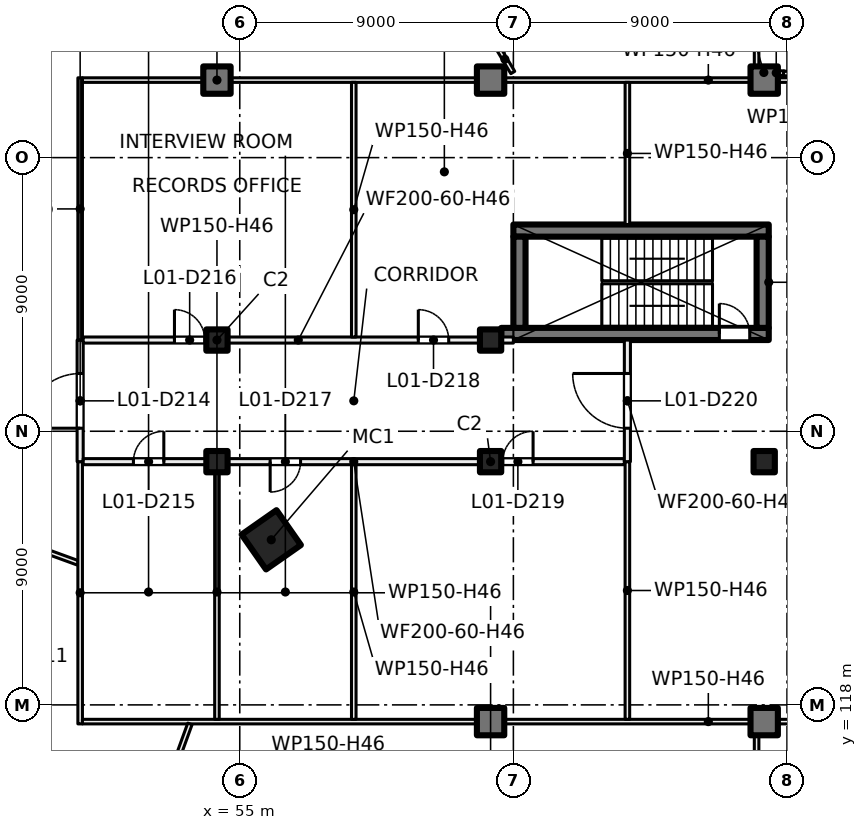
"""IFC4 building model, lengths in metres.
Left out: names, types, materials, properties, quantities, classifications, styles, units other than length and angle.
Written with IfcOpenShell. Run it as: python <this file> out.ifc"""

import sys

from ifc_helpers import new_model, si_unit, direction, frame, frame_2d, origin, origin_2d, place, context, subcontext, project, spatial, rectangle, hollow_rectangle, extrude, element, fill, save


model = new_model("IFC4")
c1 = context("Model", 3, precision=1e-05, world=origin(), true_north=direction((0.0, 1.0)))
c2 = subcontext(c1, "Body", "Model", "MODEL_VIEW")
j1 = project(units=[si_unit("LENGTHUNIT", "METRE"), si_unit("PLANEANGLEUNIT", "RADIAN")], contexts=[c1])
p1 = place(None, origin())
s1 = spatial("IfcSite", under=j1, at=p1, CompositionType="ELEMENT")
p2 = place(p1, origin())
s2 = spatial("IfcBuilding", under=s1, at=p2, CompositionType="ELEMENT")
p3 = place(p2, frame((0.0, 0.0, 7.5)))
s3 = spatial("IfcBuildingStorey", under=s2, at=p3, CompositionType="ELEMENT", Elevation=7.5)
p4 = place(p3, frame((56.036, 123.43, 0.0), z_axis=(0.0, 0.0, 1.0), x_axis=(0.573576436351, -0.819152044289, 0.0)))
e1 = element("IfcColumn", 1, at=p4, inside=s3, PredefinedType="COLUMN", context=c2, shape_type="SweptSolid", body=[
    extrude(hollow_rectangle(XDim=1.4, YDim=1.4, WallThickness=0.04, at=origin_2d()), origin(), (0.0, 0.0, 1.0), 5.0),
])
for number, where, z_axis, x_axis in (
    (2, (54.25, 130.0, 0.0), (0.0, 0.0, 1.0), (1.0, 0.0, 0.0)),
    (3, (63.25, 130.0, 0.0), (0.0, 0.0, 1.0), (1.0, 0.0, 0.0)),
    (4, (54.25, 126.0, 0.0), (0.0, 0.0, 1.0), (1.0, 0.0, 0.0)),
    (5, (63.25, 126.0, 0.0), (0.0, 0.0, 1.0), (1.0, 0.0, 0.0)),
    (6, (72.25, 126.0, 0.0), (0.0, 0.0, 1.0), (1.0, 0.0, 0.0)),
):
    element("IfcColumn", number, at=place(p3, frame(where, z_axis=z_axis, x_axis=x_axis)), inside=s3, PredefinedType="COLUMN", context=c2, shape_type="SweptSolid", body=[
        extrude(rectangle(XDim=0.7, YDim=0.7, at=origin_2d()), origin(), (0.0, 0.0, 1.0), 5.0),
    ])
for number, where, z_axis, x_axis in (
    (7, (54.25, 138.55, 0.0), (0.0, 0.0, 1.0), (1.0, 0.0, 0.0)),
    (8, (63.25, 138.55, 0.0), (0.0, 0.0, 1.0), (1.0, 0.0, 0.0)),
    (9, (72.25, 138.55, 0.0), (0.0, 0.0, 1.0), (1.0, 0.0, 0.0)),
    (10, (63.25, 117.45, 0.0), (0.0, 0.0, 1.0), (1.0, 0.0, 0.0)),
    (11, (72.25, 117.45, 0.0), (0.0, 0.0, 1.0), (1.0, 0.0, 0.0)),
):
    element("IfcColumn", number, at=place(p3, frame(where, z_axis=z_axis, x_axis=x_axis)), inside=s3, PredefinedType="COLUMN", context=c2, shape_type="SweptSolid", body=[
        extrude(rectangle(XDim=0.9, YDim=0.9, at=origin_2d()), origin(), (0.0, 0.0, 1.0), 5.0),
    ])
p5 = place(p3, frame((63.6, 130.2, 0.0), z_axis=(0.0, 0.0, 1.0), x_axis=(1.0, 0.0, 0.0)))
e12 = element("IfcWall", 12, at=p5, inside=s3, PredefinedType="SHEAR", context=c2, shape_type="SweptSolid", body=[
    extrude(rectangle(XDim=8.8, YDim=0.4, at=frame_2d((4.4, 0.0))), origin(), (0.0, 0.0, 1.0), 5.0),
])
p6 = place(p5, frame((7.175, 0.0, 0.0)))
e13 = element("IfcOpeningElement", 13, at=p6, cuts=e12, PredefinedType="OPENING", context=c2, shape_type="SweptSolid", body=[
    extrude(rectangle(XDim=1.0, YDim=2.1, at=frame_2d((0.5, 1.05))), frame((0.0, 0.21, 0.0), z_axis=(0.0, -1.0, 0.0), x_axis=(1.0, 0.0, 0.0)), (0.0, 0.0, 1.0), 0.42),
])
p7 = place(p3, frame((64.0, 133.6, 0.0), z_axis=(0.0, 0.0, 1.0), x_axis=(1.0, 0.0, 0.0)))
e14 = element("IfcWall", 14, at=p7, inside=s3, PredefinedType="SHEAR", context=c2, shape_type="SweptSolid", body=[
    extrude(rectangle(XDim=8.4, YDim=0.4, at=frame_2d((4.2, 0.0))), origin(), (0.0, 0.0, 1.0), 5.0),
])
for number, where, z_axis, x_axis in (
    (15, (64.2, 130.4, 0.0), (0.0, 0.0, 1.0), (0.0, 1.0, 0.0)),
    (16, (72.2, 130.4, 0.0), (0.0, 0.0, 1.0), (0.0, 1.0, 0.0)),
):
    element("IfcWall", number, at=place(p3, frame(where, z_axis=z_axis, x_axis=x_axis)), inside=s3, PredefinedType="SHEAR", context=c2, shape_type="SweptSolid", body=[
        extrude(rectangle(XDim=3.0, YDim=0.4, at=frame_2d((1.5, 0.0))), origin(), (0.0, 0.0, 1.0), 5.0),
    ])
p8 = place(p3, frame((46.597, 123.792, 0.0), z_axis=(0.0, 0.0, 1.0), x_axis=(0.939619227089, -0.342221723572, 0.0)))
e17 = element("IfcWall", 17, at=p8, inside=s3, PredefinedType="PARTITIONING", context=c2, shape_type="SweptSolid", body=[
    extrude(rectangle(XDim=3.276, YDim=0.15, at=frame_2d((1.638, 0.0))), origin(), (0.0, 0.0, 1.0), 4.6),
])
p9 = place(p3, frame((49.75, 117.375, 0.0), z_axis=(0.0, 0.0, 1.0), x_axis=(0.0, 1.0, 0.0)))
e18 = element("IfcWall", 18, at=p9, inside=s3, PredefinedType="PARTITIONING", context=c2, shape_type="SweptSolid", body=[
    extrude(rectangle(XDim=8.625, YDim=0.15, at=frame_2d((4.312, 0.0))), origin(), (0.0, 0.0, 1.0), 4.6),
])
p10 = place(p3, frame((91.0, 117.45, 0.0), z_axis=(0.0, 0.0, 1.0), x_axis=(-1.0, 0.0, 0.0)))
e19 = element("IfcWall", 19, at=p10, inside=s3, PredefinedType="PARTITIONING", context=c2, shape_type="SweptSolid", body=[
    extrude(rectangle(XDim=41.175, YDim=0.15, at=frame_2d((20.587, 0.0))), origin(), (0.0, 0.0, 1.0), 4.6),
])
p11 = place(p10, frame((11.5, 0.0, 0.0)))
e20 = element("IfcOpeningElement", 20, at=p11, cuts=e19, PredefinedType="OPENING", context=c2, shape_type="SweptSolid", body=[
    extrude(rectangle(XDim=1.0, YDim=2.1, at=frame_2d((0.5, 1.05))), frame((0.0, 0.085, 0.0), z_axis=(0.0, -1.0, 0.0), x_axis=(1.0, 0.0, 0.0)), (0.0, 0.0, 1.0), 0.17),
])
p12 = place(p3, frame((49.75, 126.0, 0.0), z_axis=(0.0, 0.0, 1.0), x_axis=(0.0, 1.0, 0.0)))
e21 = element("IfcWall", 21, at=p12, inside=s3, PredefinedType="PARTITIONING", context=c2, shape_type="SweptSolid", body=[
    extrude(rectangle(XDim=4.0, YDim=0.2, at=frame_2d((2.0, 0.0))), origin(), (0.0, 0.0, 1.0), 4.6),
])
p13 = place(p12, frame((1.1, 0.0, 0.0)))
e22 = element("IfcOpeningElement", 22, at=p13, cuts=e21, PredefinedType="OPENING", context=c2, shape_type="SweptSolid", body=[
    extrude(rectangle(XDim=1.8, YDim=2.1, at=frame_2d((0.9, 1.05))), frame((0.0, 0.11, 0.0), z_axis=(0.0, -1.0, 0.0), x_axis=(1.0, 0.0, 0.0)), (0.0, 0.0, 1.0), 0.22),
])
p14 = place(p3, frame((67.65, 126.0, 0.0), z_axis=(0.0, 0.0, 1.0), x_axis=(-1.0, 0.0, 0.0)))
e23 = element("IfcWall", 23, at=p14, inside=s3, PredefinedType="PARTITIONING", context=c2, shape_type="SweptSolid", body=[
    extrude(rectangle(XDim=17.8, YDim=0.2, at=frame_2d((8.9, 0.0))), origin(), (0.0, 0.0, 1.0), 4.6),
])
p15 = place(p14, frame((15.148, 0.0, 0.0)))
e24 = element("IfcOpeningElement", 24, at=p15, cuts=e23, PredefinedType="OPENING", context=c2, shape_type="SweptSolid", body=[
    extrude(rectangle(XDim=1.0, YDim=2.1, at=frame_2d((0.5, 1.05))), frame((0.0, 0.11, 0.0), z_axis=(0.0, -1.0, 0.0), x_axis=(1.0, 0.0, 0.0)), (0.0, 0.0, 1.0), 0.22),
])
p16 = place(p14, frame((10.65, 0.0, 0.0)))
e25 = element("IfcOpeningElement", 25, at=p16, cuts=e23, PredefinedType="OPENING", context=c2, shape_type="SweptSolid", body=[
    extrude(rectangle(XDim=1.0, YDim=2.1, at=frame_2d((0.5, 1.05))), frame((0.0, 0.11, 0.0), z_axis=(0.0, -1.0, 0.0), x_axis=(1.0, 0.0, 0.0)), (0.0, 0.0, 1.0), 0.22),
])
p17 = place(p14, frame((3.002, 0.0, 0.0)))
e26 = element("IfcOpeningElement", 26, at=p17, cuts=e23, PredefinedType="OPENING", context=c2, shape_type="SweptSolid", body=[
    extrude(rectangle(XDim=1.0, YDim=2.1, at=frame_2d((0.5, 1.05))), frame((0.0, 0.11, 0.0), z_axis=(0.0, -1.0, 0.0), x_axis=(1.0, 0.0, 0.0)), (0.0, 0.0, 1.0), 0.22),
])
p18 = place(p3, frame((49.75, 130.0, 0.0), z_axis=(0.0, 0.0, 1.0), x_axis=(0.0, 1.0, 0.0)))
e27 = element("IfcWall", 27, at=p18, inside=s3, PredefinedType="PARTITIONING", context=c2, shape_type="SweptSolid", body=[
    extrude(rectangle(XDim=8.625, YDim=0.15, at=frame_2d((4.312, 0.0))), origin(), (0.0, 0.0, 1.0), 4.6),
])
p19 = place(p3, frame((49.85, 130.0, 0.0), z_axis=(0.0, 0.0, 1.0), x_axis=(1.0, 0.0, 0.0)))
e28 = element("IfcWall", 28, at=p19, inside=s3, PredefinedType="PARTITIONING", context=c2, shape_type="SweptSolid", body=[
    extrude(rectangle(XDim=14.15, YDim=0.2, at=frame_2d((7.075, 0.0))), origin(), (0.0, 0.0, 1.0), 4.6),
])
p20 = place(p19, frame((3.002, 0.0, 0.0)))
e29 = element("IfcOpeningElement", 29, at=p20, cuts=e28, PredefinedType="OPENING", context=c2, shape_type="SweptSolid", body=[
    extrude(rectangle(XDim=1.0, YDim=2.1, at=frame_2d((0.5, 1.05))), frame((0.0, 0.11, 0.0), z_axis=(0.0, -1.0, 0.0), x_axis=(1.0, 0.0, 0.0)), (0.0, 0.0, 1.0), 0.22),
])
p21 = place(p19, frame((11.023, 0.0, 0.0)))
e30 = element("IfcOpeningElement", 30, at=p21, cuts=e28, PredefinedType="OPENING", context=c2, shape_type="SweptSolid", body=[
    extrude(rectangle(XDim=1.0, YDim=2.1, at=frame_2d((0.5, 1.05))), frame((0.0, 0.11, 0.0), z_axis=(0.0, -1.0, 0.0), x_axis=(1.0, 0.0, 0.0)), (0.0, 0.0, 1.0), 0.22),
])
p22 = place(p3, frame((49.825, 138.55, 0.0), z_axis=(0.0, 0.0, 1.0), x_axis=(1.0, 0.0, 0.0)))
e31 = element("IfcWall", 31, at=p22, inside=s3, PredefinedType="PARTITIONING", context=c2, shape_type="SweptSolid", body=[
    extrude(rectangle(XDim=41.175, YDim=0.15, at=frame_2d((20.587, 0.0))), origin(), (0.0, 0.0, 1.0), 4.6),
])
p23 = place(p22, frame((29.645, 0.0, 0.0)))
e32 = element("IfcOpeningElement", 32, at=p23, cuts=e31, PredefinedType="OPENING", context=c2, shape_type="SweptSolid", body=[
    extrude(rectangle(XDim=1.0, YDim=2.1, at=frame_2d((0.5, 1.05))), frame((0.0, 0.085, 0.0), z_axis=(0.0, -1.0, 0.0), x_axis=(1.0, 0.0, 0.0)), (0.0, 0.0, 1.0), 0.17),
])
p24 = place(p22, frame((37.775, 0.0, 0.0)))
e33 = element("IfcOpeningElement", 33, at=p24, cuts=e31, PredefinedType="OPENING", context=c2, shape_type="SweptSolid", body=[
    extrude(rectangle(XDim=1.8, YDim=2.1, at=frame_2d((0.9, 1.05))), frame((0.0, 0.085, 0.0), z_axis=(0.0, -1.0, 0.0), x_axis=(1.0, 0.0, 0.0)), (0.0, 0.0, 1.0), 0.17),
])
p25 = place(p3, frame((51.579, 112.481, 0.0), z_axis=(0.0, 0.0, 1.0), x_axis=(0.341972650852, 0.939709905274, 0.0)))
e34 = element("IfcWall", 34, at=p25, inside=s3, PredefinedType="PARTITIONING", context=c2, shape_type="SweptSolid", body=[
    extrude(rectangle(XDim=5.208, YDim=0.15, at=frame_2d((2.604, 0.0))), origin(), (0.0, 0.0, 1.0), 4.6),
])
for number, where, z_axis, x_axis in (
    (35, (54.25, 117.525, 0.0), (0.0, 0.0, 1.0), (0.0, 1.0, 0.0)),
    (36, (58.75, 117.525, 0.0), (0.0, 0.0, 1.0), (0.0, 1.0, 0.0)),
    (37, (58.75, 130.1, 0.0), (0.0, 0.0, 1.0), (0.0, 1.0, 0.0)),
):
    element("IfcWall", number, at=place(p3, frame(where, z_axis=z_axis, x_axis=x_axis)), inside=s3, PredefinedType="PARTITIONING", context=c2, shape_type="SweptSolid", body=[
        extrude(rectangle(XDim=8.375, YDim=0.15, at=frame_2d((4.188, 0.0))), origin(), (0.0, 0.0, 1.0), 4.6),
    ])
p26 = place(p3, frame((63.459, 139.67, 0.0), z_axis=(0.0, 0.0, 1.0), x_axis=(0.514106720628, -0.857726226604, 0.0)))
e38 = element("IfcWall", 38, at=p26, inside=s3, PredefinedType="PARTITIONING", context=c2, shape_type="SweptSolid", body=[
    extrude(rectangle(XDim=1.015, YDim=0.15, at=frame_2d((0.508, 0.0))), origin(), (0.0, 0.0, 1.0), 4.6),
])
p27 = place(p3, frame((67.75, 117.525, 0.0), z_axis=(0.0, 0.0, 1.0), x_axis=(0.0, 1.0, 0.0)))
e39 = element("IfcWall", 39, at=p27, inside=s3, PredefinedType="PARTITIONING", context=c2, shape_type="SweptSolid", body=[
    extrude(rectangle(XDim=8.475, YDim=0.15, at=frame_2d((4.238, 0.0))), origin(), (0.0, 0.0, 1.0), 4.6),
])
p28 = place(p3, frame((67.75, 130.0, 0.0), z_axis=(0.0, 0.0, 1.0), x_axis=(0.0, -1.0, 0.0)))
e40 = element("IfcWall", 40, at=p28, inside=s3, PredefinedType="PARTITIONING", context=c2, shape_type="SweptSolid", body=[
    extrude(rectangle(XDim=4.0, YDim=0.2, at=frame_2d((2.0, 0.0))), origin(), (0.0, 0.0, 1.0), 4.6),
])
p29 = place(p28, frame((1.1, 0.0, 0.0)))
e41 = element("IfcOpeningElement", 41, at=p29, cuts=e40, PredefinedType="OPENING", context=c2, shape_type="SweptSolid", body=[
    extrude(rectangle(XDim=1.8, YDim=2.1, at=frame_2d((0.9, 1.05))), frame((0.0, 0.11, 0.0), z_axis=(0.0, -1.0, 0.0), x_axis=(1.0, 0.0, 0.0)), (0.0, 0.0, 1.0), 0.22),
])
p30 = place(p3, frame((67.75, 133.8, 0.0), z_axis=(0.0, 0.0, 1.0), x_axis=(0.0, 1.0, 0.0)))
e42 = element("IfcWall", 42, at=p30, inside=s3, PredefinedType="PARTITIONING", context=c2, shape_type="SweptSolid", body=[
    extrude(rectangle(XDim=4.675, YDim=0.15, at=frame_2d((2.337, 0.0))), origin(), (0.0, 0.0, 1.0), 4.6),
])
p31 = place(p3, frame((72.0, 109.0, 0.0), z_axis=(0.0, 0.0, 1.0), x_axis=(0.0, 1.0, 0.0)))
e43 = element("IfcWall", 43, at=p31, inside=s3, PredefinedType="PARTITIONING", context=c2, shape_type="SweptSolid", body=[
    extrude(rectangle(XDim=8.375, YDim=0.15, at=frame_2d((4.188, 0.0))), origin(), (0.0, 0.0, 1.0), 3.6),
])
p32 = place(p3, frame((72.0, 138.725, 0.0), z_axis=(0.0, 0.0, 1.0), x_axis=(0.0, 1.0, 0.0)))
e44 = element("IfcWall", 44, at=p32, inside=s3, PredefinedType="PARTITIONING", context=c2, shape_type="SweptSolid", body=[
    extrude(rectangle(XDim=5.35, YDim=0.15, at=frame_2d((2.675, 0.0))), origin(), (0.0, 0.0, 1.0), 4.6),
])
p33 = place(p3, frame((72.075, 138.8, 0.0), z_axis=(0.0, 0.0, 1.0), x_axis=(1.0, 0.0, 0.0)))
e45 = element("IfcWall", 45, at=p33, inside=s3, PredefinedType="PARTITIONING", context=c2, shape_type="SweptSolid", body=[
    extrude(rectangle(XDim=0.327, YDim=0.15, at=frame_2d((0.164, 0.0))), origin(), (0.0, 0.0, 1.0), 4.6),
])
p34 = place(p3, frame((72.398, 138.8, 0.0), z_axis=(0.0, 0.0, 1.0), x_axis=(0.998815266503, -0.048662751665, 0.0)))
e46 = element("IfcWall", 46, at=p34, inside=s3, PredefinedType="PARTITIONING", context=c2, shape_type="SweptSolid", body=[
    extrude(rectangle(XDim=0.497, YDim=0.15, at=frame_2d((0.248, 0.0))), origin(), (0.0, 0.0, 1.0), 4.6),
])
p35 = place(p3, frame((72.886, 138.777, 0.0), z_axis=(0.0, 0.0, 1.0), x_axis=(0.988853572557, -0.148891275908, 0.0)))
e47 = element("IfcWall", 47, at=p35, inside=s3, PredefinedType="PARTITIONING", context=c2, shape_type="SweptSolid", body=[
    extrude(rectangle(XDim=0.499, YDim=0.15, at=frame_2d((0.249, 0.0))), origin(), (0.0, 0.0, 1.0), 4.6),
])
p36 = place(p6, origin())
e48 = element("IfcDoor", 48, at=p36, inside=s3, OperationType="SINGLE_SWING_LEFT", PredefinedType="DOOR", context=c2, shape_type="SweptSolid", body=[
    extrude(rectangle(XDim=1.0, YDim=2.1, at=frame_2d((0.5, 1.05))), frame((0.0, 0.025, 0.0), z_axis=(0.0, -1.0, 0.0), x_axis=(1.0, 0.0, 0.0)), (0.0, 0.0, 1.0), 0.05),
])
fill(e13, e48)
p37 = place(p13, origin())
e49 = element("IfcDoor", 49, at=p37, inside=s3, OperationType="DOUBLE_DOOR_SINGLE_SWING", PredefinedType="DOOR", context=c2, shape_type="SweptSolid", body=[
    extrude(rectangle(XDim=1.8, YDim=2.1, at=frame_2d((0.9, 1.05))), frame((0.0, 0.025, 0.0), z_axis=(0.0, -1.0, 0.0), x_axis=(1.0, 0.0, 0.0)), (0.0, 0.0, 1.0), 0.05),
])
fill(e22, e49)
p38 = place(p15, origin())
e50 = element("IfcDoor", 50, at=p38, inside=s3, OperationType="SINGLE_SWING_LEFT", PredefinedType="DOOR", context=c2, shape_type="SweptSolid", body=[
    extrude(rectangle(XDim=1.0, YDim=2.1, at=frame_2d((0.5, 1.05))), frame((0.0, 0.025, 0.0), z_axis=(0.0, -1.0, 0.0), x_axis=(1.0, 0.0, 0.0)), (0.0, 0.0, 1.0), 0.05),
])
fill(e24, e50)
p39 = place(p20, origin())
e51 = element("IfcDoor", 51, at=p39, inside=s3, OperationType="SINGLE_SWING_LEFT", PredefinedType="DOOR", context=c2, shape_type="SweptSolid", body=[
    extrude(rectangle(XDim=1.0, YDim=2.1, at=frame_2d((0.5, 1.05))), frame((0.0, 0.025, 0.0), z_axis=(0.0, -1.0, 0.0), x_axis=(1.0, 0.0, 0.0)), (0.0, 0.0, 1.0), 0.05),
])
fill(e29, e51)
p40 = place(p16, origin())
e52 = element("IfcDoor", 52, at=p40, inside=s3, OperationType="SINGLE_SWING_RIGHT", PredefinedType="DOOR", context=c2, shape_type="SweptSolid", body=[
    extrude(rectangle(XDim=1.0, YDim=2.1, at=frame_2d((0.5, 1.05))), frame((0.0, 0.025, 0.0), z_axis=(0.0, -1.0, 0.0), x_axis=(1.0, 0.0, 0.0)), (0.0, 0.0, 1.0), 0.05),
])
fill(e25, e52)
p41 = place(p21, origin())
e53 = element("IfcDoor", 53, at=p41, inside=s3, OperationType="SINGLE_SWING_LEFT", PredefinedType="DOOR", context=c2, shape_type="SweptSolid", body=[
    extrude(rectangle(XDim=1.0, YDim=2.1, at=frame_2d((0.5, 1.05))), frame((0.0, 0.025, 0.0), z_axis=(0.0, -1.0, 0.0), x_axis=(1.0, 0.0, 0.0)), (0.0, 0.0, 1.0), 0.05),
])
fill(e30, e53)
p42 = place(p17, origin())
e54 = element("IfcDoor", 54, at=p42, inside=s3, OperationType="SINGLE_SWING_LEFT", PredefinedType="DOOR", context=c2, shape_type="SweptSolid", body=[
    extrude(rectangle(XDim=1.0, YDim=2.1, at=frame_2d((0.5, 1.05))), frame((0.0, 0.025, 0.0), z_axis=(0.0, -1.0, 0.0), x_axis=(1.0, 0.0, 0.0)), (0.0, 0.0, 1.0), 0.05),
])
fill(e26, e54)
p43 = place(p29, origin())
e55 = element("IfcDoor", 55, at=p43, inside=s3, OperationType="DOUBLE_DOOR_SINGLE_SWING", PredefinedType="DOOR", context=c2, shape_type="SweptSolid", body=[
    extrude(rectangle(XDim=1.8, YDim=2.1, at=frame_2d((0.9, 1.05))), frame((0.0, 0.025, 0.0), z_axis=(0.0, -1.0, 0.0), x_axis=(1.0, 0.0, 0.0)), (0.0, 0.0, 1.0), 0.05),
])
fill(e41, e55)
save(model, sys.argv[1])
